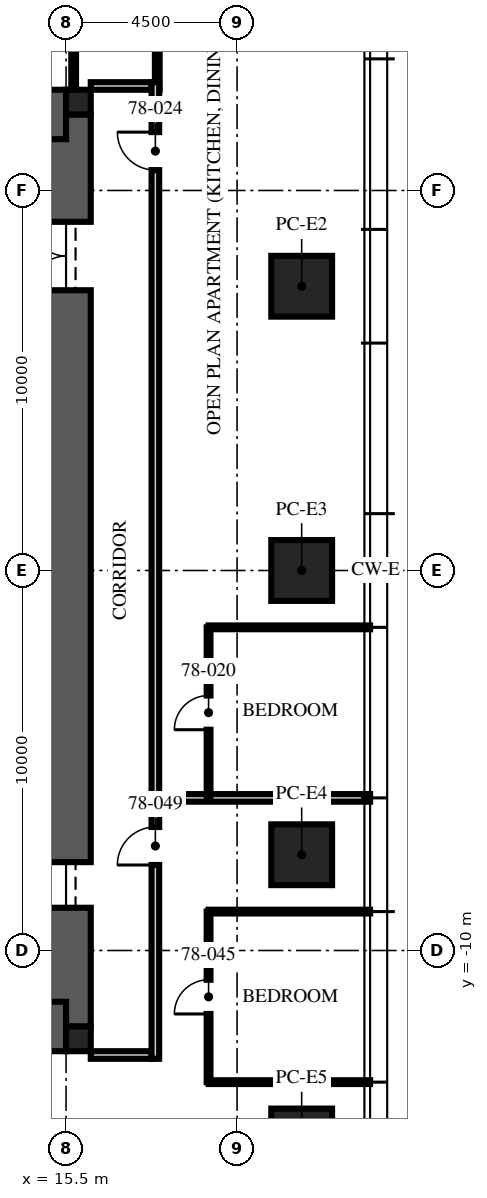
"""IFC4 building model, lengths in metres.
Left out: names, types, materials, properties, quantities, classifications, styles, units other than length and angle.
Written with IfcOpenShell. Run it as: python <this file> out.ifc"""

import sys

from ifc_helpers import new_model, si_unit, direction, frame, frame_2d, origin, origin_2d, place, context, subcontext, project, spatial, rectangle, extrude, element, fill, save


model = new_model("IFC4")
c1 = context("Model", 3, precision=1e-05, world=origin(), true_north=direction((0.0, 1.0)))
c2 = subcontext(c1, "Body", "Model", "MODEL_VIEW")
j1 = project(units=[si_unit("LENGTHUNIT", "METRE"), si_unit("PLANEANGLEUNIT", "RADIAN")], contexts=[c1])
p1 = place(None, origin())
s1 = spatial("IfcSite", under=j1, at=p1, CompositionType="ELEMENT")
p2 = place(p1, origin())
s2 = spatial("IfcBuilding", under=s1, at=p2, CompositionType="ELEMENT")
p3 = place(p2, frame((0.0, 0.0, 312.0)))
s3 = spatial("IfcBuildingStorey", under=s2, at=p3, CompositionType="ELEMENT", Elevation=312.0)
p4 = place(p3, frame((15.5, -12.0, -0.25), z_axis=(0.0, 0.0, 1.0), x_axis=(0.0, 1.0, 0.0)))
e1 = element("IfcWall", 1, at=p4, inside=s3, PredefinedType="SHEAR", context=c2, shape_type="SweptSolid", body=[
    extrude(rectangle(XDim=24.0, YDim=1.3, at=frame_2d((12.0, 0.0))), origin(), (0.0, 0.0, 1.0), 3.75),
])
p5 = place(p4, frame((3.125, 0.0, 0.25)))
e2 = element("IfcOpeningElement", 2, at=p5, cuts=e1, PredefinedType="OPENING", context=c2, shape_type="SweptSolid", body=[
    extrude(rectangle(XDim=1.2, YDim=2.1, at=frame_2d((0.6, 1.05))), frame((0.0, 0.66, 0.0), z_axis=(0.0, -1.0, 0.0), x_axis=(1.0, 0.0, 0.0)), (0.0, 0.0, 1.0), 1.32),
])
p6 = place(p4, frame((19.375, 0.0, 0.25)))
e3 = element("IfcOpeningElement", 3, at=p6, cuts=e1, PredefinedType="OPENING", context=c2, shape_type="SweptSolid", body=[
    extrude(rectangle(XDim=1.8, YDim=2.1, at=frame_2d((0.9, 1.05))), frame((0.0, 0.66, 0.0), z_axis=(0.0, -1.0, 0.0), x_axis=(1.0, 0.0, 0.0)), (0.0, 0.0, 1.0), 1.32),
])
for number, where, z_axis, x_axis in (
    (4, (-15.5, 12.0, -0.25), (0.0, 0.0, 1.0), (1.0, 0.0, 0.0)),
    (5, (-15.5, -12.0, -0.25), (0.0, 0.0, 1.0), (1.0, 0.0, 0.0)),
):
    element("IfcWall", number, at=place(p3, frame(where, z_axis=z_axis, x_axis=x_axis)), inside=s3, PredefinedType="SHEAR", context=c2, shape_type="SweptSolid", body=[
        extrude(rectangle(XDim=31.0, YDim=1.3, at=frame_2d((15.5, 0.0))), origin(), (0.0, 0.0, 1.0), 3.75),
    ])
for number, where, z_axis, x_axis in (
    (6, (15.825, 12.325, -0.25), (0.0, 0.0, 1.0), (1.0, 0.0, 0.0)),
    (7, (15.825, -12.325, -0.25), (0.0, 0.0, 1.0), (1.0, 0.0, 0.0)),
):
    element("IfcColumn", number, at=place(p3, frame(where, z_axis=z_axis, x_axis=x_axis)), inside=s3, PredefinedType="COLUMN", context=c2, shape_type="SweptSolid", body=[
        extrude(rectangle(XDim=0.65, YDim=0.65, at=origin_2d()), origin(), (0.0, 0.0, 1.0), 3.75),
    ])
for number, where, z_axis, x_axis in (
    (8, (21.7, 7.48, 0.0), (0.0, 0.0, 1.0), (0.0, 1.0, 0.0)),
    (9, (21.7, 0.0, 0.0), (0.0, 0.0, 1.0), (0.0, 1.0, 0.0)),
    (10, (21.7, -7.48, 0.0), (0.0, 0.0, 1.0), (0.0, 1.0, 0.0)),
    (11, (21.7, -14.96, 0.0), (0.0, 0.0, 1.0), (0.0, 1.0, 0.0)),
):
    element("IfcColumn", number, at=place(p3, frame(where, z_axis=z_axis, x_axis=x_axis)), inside=s3, PredefinedType="COLUMN", context=c2, shape_type="SweptSolid", body=[
        extrude(rectangle(XDim=1.6, YDim=1.6, at=origin_2d()), origin(), (0.0, 0.0, 1.0), 3.75),
    ])
for number, where, z_axis, x_axis in (
    (12, (16.15, 12.75, 0.0), (0.0, 0.0, 1.0), (1.0, 0.0, 0.0)),
    (13, (16.15, -12.75, 0.0), (0.0, 0.0, 1.0), (1.0, 0.0, 0.0)),
):
    element("IfcWall", number, at=place(p3, frame(where, z_axis=z_axis, x_axis=x_axis)), inside=s3, PredefinedType="PARTITIONING", context=c2, shape_type="SweptSolid", body=[
        extrude(rectangle(XDim=1.6, YDim=0.2, at=frame_2d((0.8, 0.0))), origin(), (0.0, 0.0, 1.0), 2.6),
    ])
p7 = place(p3, frame((17.95, -5.984, 0.0), z_axis=(0.0, 0.0, 1.0), x_axis=(1.0, 0.0, 0.0)))
e14 = element("IfcWall", 14, at=p7, inside=s3, PredefinedType="PARTITIONING", context=c2, shape_type="SweptSolid", body=[
    extrude(rectangle(XDim=5.55, YDim=0.2, at=frame_2d((2.775, 0.0))), origin(), (0.0, 0.0, 1.0), 3.01),
])
for number, where, z_axis, x_axis in (
    (15, (19.25, -1.496, 0.0), (0.0, 0.0, 1.0), (1.0, 0.0, 0.0)),
    (16, (19.25, -13.464, 0.0), (0.0, 0.0, 1.0), (1.0, 0.0, 0.0)),
    (17, (19.25, -8.976, 0.0), (0.0, 0.0, 1.0), (1.0, 0.0, 0.0)),
):
    element("IfcWall", number, at=place(p3, frame(where, z_axis=z_axis, x_axis=x_axis)), inside=s3, PredefinedType="PARTITIONING", context=c2, shape_type="SweptSolid", body=[
        extrude(rectangle(XDim=4.25, YDim=0.1, at=frame_2d((2.125, 0.0))), origin(), (0.0, 0.0, 1.0), 3.01),
    ])
p8 = place(p3, frame((19.25, -5.984, 0.0), z_axis=(0.0, 0.0, 1.0), x_axis=(0.0, 1.0, 0.0)))
e18 = element("IfcWall", 18, at=p8, inside=s3, PredefinedType="PARTITIONING", context=c2, shape_type="SweptSolid", body=[
    extrude(rectangle(XDim=4.488, YDim=0.1, at=frame_2d((2.244, 0.0))), origin(), (0.0, 0.0, 1.0), 2.91),
])
p9 = place(p8, frame((1.794, 0.0, 0.0)))
e19 = element("IfcOpeningElement", 19, at=p9, cuts=e18, PredefinedType="OPENING", context=c2, shape_type="SweptSolid", body=[
    extrude(rectangle(XDim=0.9, YDim=2.1, at=frame_2d((0.45, 1.05))), frame((0.0, 0.06, 0.0), z_axis=(0.0, -1.0, 0.0), x_axis=(1.0, 0.0, 0.0)), (0.0, 0.0, 1.0), 0.12),
])
for number, where, z_axis, x_axis in (
    (20, (17.9, 12.65, 0.0), (0.0, 0.0, 1.0), (0.0, 1.0, 0.0)),
    (21, (15.7, 12.65, 0.0), (0.0, 0.0, 1.0), (0.0, 1.0, 0.0)),
):
    element("IfcWall", number, at=place(p3, frame(where, z_axis=z_axis, x_axis=x_axis)), inside=s3, PredefinedType="PARTITIONING", context=c2, shape_type="SweptSolid", body=[
        extrude(rectangle(XDim=4.096, YDim=0.125, at=frame_2d((2.048, 0.0))), origin(), (0.0, 0.0, 1.0), 2.6),
    ])
p10 = place(p3, frame((19.25, -13.464, 0.0), z_axis=(0.0, 0.0, 1.0), x_axis=(0.0, 1.0, 0.0)))
e22 = element("IfcWall", 22, at=p10, inside=s3, PredefinedType="PARTITIONING", context=c2, shape_type="SweptSolid", body=[
    extrude(rectangle(XDim=4.488, YDim=0.1, at=frame_2d((2.244, 0.0))), origin(), (0.0, 0.0, 1.0), 2.91),
])
p11 = place(p10, frame((1.794, 0.0, 0.0)))
e23 = element("IfcOpeningElement", 23, at=p11, cuts=e22, PredefinedType="OPENING", context=c2, shape_type="SweptSolid", body=[
    extrude(rectangle(XDim=0.9, YDim=2.1, at=frame_2d((0.45, 1.05))), frame((0.0, 0.06, 0.0), z_axis=(0.0, -1.0, 0.0), x_axis=(1.0, 0.0, 0.0)), (0.0, 0.0, 1.0), 0.12),
])
p12 = place(p3, frame((17.85, -12.85, 0.0), z_axis=(0.0, 0.0, 1.0), x_axis=(0.0, 1.0, 0.0)))
e24 = element("IfcWall", 24, at=p12, inside=s3, PredefinedType="PARTITIONING", context=c2, shape_type="SweptSolid", body=[
    extrude(rectangle(XDim=25.7, YDim=0.2, at=frame_2d((12.85, 0.0))), origin(), (0.0, 0.0, 1.0), 2.9),
])
p13 = place(p12, frame((23.386, 0.0, 0.0)))
e25 = element("IfcOpeningElement", 25, at=p13, cuts=e24, PredefinedType="OPENING", context=c2, shape_type="SweptSolid", body=[
    extrude(rectangle(XDim=1.0, YDim=2.2, at=frame_2d((0.5, 1.1))), frame((0.0, 0.11, 0.0), z_axis=(0.0, -1.0, 0.0), x_axis=(1.0, 0.0, 0.0)), (0.0, 0.0, 1.0), 0.22),
])
p14 = place(p12, frame((5.1, 0.0, 0.0)))
e26 = element("IfcOpeningElement", 26, at=p14, cuts=e24, PredefinedType="OPENING", context=c2, shape_type="SweptSolid", body=[
    extrude(rectangle(XDim=1.0, YDim=2.2, at=frame_2d((0.5, 1.1))), frame((0.0, 0.11, 0.0), z_axis=(0.0, -1.0, 0.0), x_axis=(1.0, 0.0, 0.0)), (0.0, 0.0, 1.0), 0.22),
])
p15 = place(p5, origin())
e27 = element("IfcDoor", 27, at=p15, inside=s3, OperationType="SINGLE_SWING_LEFT", PredefinedType="DOOR", context=c2, shape_type="SweptSolid", body=[
    extrude(rectangle(XDim=1.2, YDim=2.1, at=frame_2d((0.6, 1.05))), frame((0.0, 0.025, 0.0), z_axis=(0.0, -1.0, 0.0), x_axis=(1.0, 0.0, 0.0)), (0.0, 0.0, 1.0), 0.05),
])
fill(e2, e27)
p16 = place(p6, origin())
e28 = element("IfcDoor", 28, at=p16, inside=s3, OperationType="DOUBLE_DOOR_SINGLE_SWING", PredefinedType="DOOR", context=c2, shape_type="SweptSolid", body=[
    extrude(rectangle(XDim=1.8, YDim=2.1, at=frame_2d((0.9, 1.05))), frame((0.0, 0.025, 0.0), z_axis=(0.0, -1.0, 0.0), x_axis=(1.0, 0.0, 0.0)), (0.0, 0.0, 1.0), 0.05),
])
fill(e3, e28)
p17 = place(p9, origin())
e29 = element("IfcDoor", 29, at=p17, inside=s3, OperationType="SINGLE_SWING_LEFT", PredefinedType="DOOR", context=c2, shape_type="SweptSolid", body=[
    extrude(rectangle(XDim=0.9, YDim=2.1, at=frame_2d((0.45, 1.05))), frame((0.0, 0.025, 0.0), z_axis=(0.0, -1.0, 0.0), x_axis=(1.0, 0.0, 0.0)), (0.0, 0.0, 1.0), 0.05),
])
fill(e19, e29)
p18 = place(p13, origin())
e30 = element("IfcDoor", 30, at=p18, inside=s3, OperationType="SINGLE_SWING_RIGHT", PredefinedType="DOOR", context=c2, shape_type="SweptSolid", body=[
    extrude(rectangle(XDim=1.0, YDim=2.2, at=frame_2d((0.5, 1.1))), frame((0.0, 0.025, 0.0), z_axis=(0.0, -1.0, 0.0), x_axis=(1.0, 0.0, 0.0)), (0.0, 0.0, 1.0), 0.05),
])
fill(e25, e30)
p19 = place(p11, origin())
e31 = element("IfcDoor", 31, at=p19, inside=s3, OperationType="SINGLE_SWING_LEFT", PredefinedType="DOOR", context=c2, shape_type="SweptSolid", body=[
    extrude(rectangle(XDim=0.9, YDim=2.1, at=frame_2d((0.45, 1.05))), frame((0.0, 0.025, 0.0), z_axis=(0.0, -1.0, 0.0), x_axis=(1.0, 0.0, 0.0)), (0.0, 0.0, 1.0), 0.05),
])
fill(e23, e31)
p20 = place(p14, origin())
e32 = element("IfcDoor", 32, at=p20, inside=s3, OperationType="SINGLE_SWING_LEFT", PredefinedType="DOOR", context=c2, shape_type="SweptSolid", body=[
    extrude(rectangle(XDim=1.0, YDim=2.2, at=frame_2d((0.5, 1.1))), frame((0.0, 0.025, 0.0), z_axis=(0.0, -1.0, 0.0), x_axis=(1.0, 0.0, 0.0)), (0.0, 0.0, 1.0), 0.05),
])
fill(e26, e32)
save(model, sys.argv[1])
